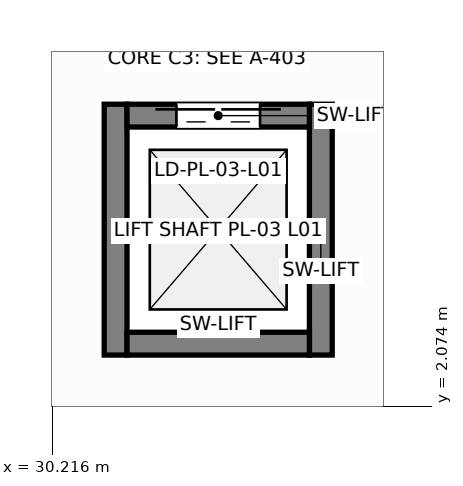
"""IFC4 building model, lengths in metres.
Left out: names, types, materials, properties, quantities, classifications, styles, units other than length and angle.
Written with IfcOpenShell. Run it as: python <this file> out.ifc"""

import sys

from ifc_helpers import new_model, si_unit, direction, frame, frame_2d, origin, place, context, subcontext, project, spatial, rectangle, extrude, element, fill, save


model = new_model("IFC4")
c1 = context("Model", 3, precision=1e-05, world=origin(), true_north=direction((0.0, 1.0)))
c2 = subcontext(c1, "Body", "Model", "MODEL_VIEW")
j1 = project(units=[si_unit("LENGTHUNIT", "METRE"), si_unit("PLANEANGLEUNIT", "RADIAN")], contexts=[c1])
p1 = place(None, origin())
s1 = spatial("IfcSite", under=j1, at=p1, CompositionType="ELEMENT")
p2 = place(p1, origin())
s2 = spatial("IfcBuilding", under=s1, at=p2, CompositionType="ELEMENT")
p3 = place(p2, frame((0.0, 0.0, 4.8)))
s3 = spatial("IfcBuildingStorey", under=s2, at=p3, CompositionType="ELEMENT", Elevation=4.8)
for number, where, z_axis, x_axis in (
    (1, (31.05, 2.75, 0.0), (0.0, 0.0, 1.0), (0.0, 1.0, 0.0)),
    (2, (33.75, 2.75, 0.0), (0.0, 0.0, 1.0), (0.0, 1.0, 0.0)),
):
    element("IfcWall", number, at=place(p3, frame(where, z_axis=z_axis, x_axis=x_axis)), inside=s3, PredefinedType="SHEAR", context=c2, shape_type="SweptSolid", body=[
        extrude(rectangle(XDim=3.3, YDim=0.3, at=frame_2d((1.65, 0.0))), origin(), (0.0, 0.0, 1.0), 3.96),
    ])
p4 = place(p3, frame((31.2, 5.9, 0.0), z_axis=(0.0, 0.0, 1.0), x_axis=(1.0, 0.0, 0.0)))
e3 = element("IfcWall", 3, at=p4, inside=s3, PredefinedType="SHEAR", context=c2, shape_type="SweptSolid", body=[
    extrude(rectangle(XDim=2.4, YDim=0.3, at=frame_2d((1.2, 0.0))), origin(), (0.0, 0.0, 1.0), 3.96),
])
p5 = place(p4, frame((0.65, 0.0, 0.0)))
e4 = element("IfcOpeningElement", 4, at=p5, cuts=e3, PredefinedType="OPENING", context=c2, shape_type="SweptSolid", body=[
    extrude(rectangle(XDim=1.1, YDim=2.15, at=frame_2d((0.55, 1.075))), frame((0.0, 0.16, 0.0), z_axis=(0.0, -1.0, 0.0), x_axis=(1.0, 0.0, 0.0)), (0.0, 0.0, 1.0), 0.32),
])
p6 = place(p3, frame((31.2, 2.9, 0.0), z_axis=(0.0, 0.0, 1.0), x_axis=(1.0, 0.0, 0.0)))
e5 = element("IfcWall", 5, at=p6, inside=s3, PredefinedType="SHEAR", context=c2, shape_type="SweptSolid", body=[
    extrude(rectangle(XDim=2.4, YDim=0.3, at=frame_2d((1.2, 0.0))), origin(), (0.0, 0.0, 1.0), 3.96),
])
p7 = place(p5, origin())
e6 = element("IfcDoor", 6, at=p7, inside=s3, OperationType="DOUBLE_DOOR_SLIDING", PredefinedType="DOOR", context=c2, shape_type="SweptSolid", body=[
    extrude(rectangle(XDim=1.1, YDim=2.15, at=frame_2d((0.55, 1.075))), frame((0.0, 0.025, 0.0), z_axis=(0.0, -1.0, 0.0), x_axis=(1.0, 0.0, 0.0)), (0.0, 0.0, 1.0), 0.05),
])
fill(e4, e6)
save(model, sys.argv[1])
